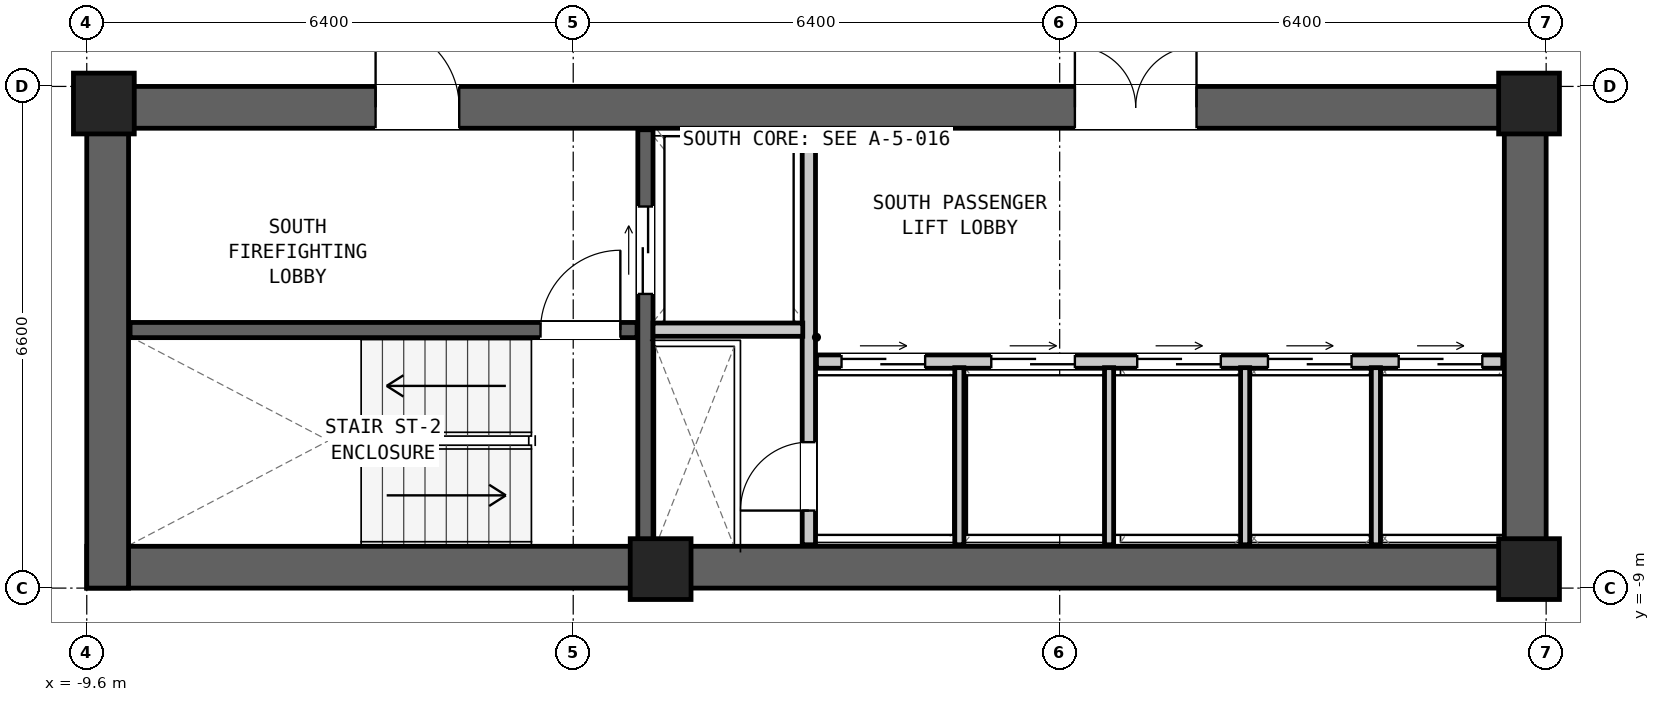
"""IFC4 building model, lengths in metres.
Left out: names, types, materials, properties, quantities, classifications, styles, units other than length and angle.
Written with IfcOpenShell. Run it as: python <this file> out.ifc"""

import sys

from ifc_helpers import new_model, si_unit, direction, frame, frame_2d, origin, origin_2d, place, context, subcontext, project, spatial, rectangle, extrude, element, fill, save


model = new_model("IFC4")
c1 = context("Model", 3, precision=1e-05, world=origin(), true_north=direction((0.0, 1.0)))
c2 = subcontext(c1, "Body", "Model", "MODEL_VIEW")
j1 = project(units=[si_unit("LENGTHUNIT", "METRE"), si_unit("PLANEANGLEUNIT", "RADIAN")], contexts=[c1])
p1 = place(None, origin())
s1 = spatial("IfcSite", under=j1, at=p1, CompositionType="ELEMENT")
p2 = place(p1, origin())
s2 = spatial("IfcBuilding", under=s1, at=p2, CompositionType="ELEMENT")
p3 = place(p2, frame((0.0, 0.0, 47.45)))
s3 = spatial("IfcBuildingStorey", under=s2, at=p3, CompositionType="ELEMENT", Elevation=47.45)
p4 = place(p3, frame((-9.6, -8.725, 0.0), z_axis=(0.0, 0.0, 1.0), x_axis=(1.0, 0.0, 0.0)))
e1 = element("IfcWall", 1, at=p4, inside=s3, PredefinedType="SHEAR", context=c2, shape_type="SweptSolid", body=[
    extrude(rectangle(XDim=19.2, YDim=0.55, at=frame_2d((9.6, 0.0))), origin(), (0.0, 0.0, 1.0), 3.05),
])
p5 = place(p3, frame((-9.6, -2.675, 0.0), z_axis=(0.0, 0.0, 1.0), x_axis=(1.0, 0.0, 0.0)))
e2 = element("IfcWall", 2, at=p5, inside=s3, PredefinedType="SHEAR", context=c2, shape_type="SweptSolid", body=[
    extrude(rectangle(XDim=19.2, YDim=0.55, at=frame_2d((9.6, 0.0))), origin(), (0.0, 0.0, 1.0), 3.05),
])
p6 = place(p5, frame((3.8, 0.0, 0.0)))
e3 = element("IfcOpeningElement", 3, at=p6, cuts=e2, PredefinedType="OPENING", context=c2, shape_type="SweptSolid", body=[
    extrude(rectangle(XDim=1.1, YDim=2.08, at=frame_2d((0.55, 1.04))), frame((0.0, 0.287, 0.0), z_axis=(0.0, -1.0, 0.0), x_axis=(1.0, 0.0, 0.0)), (0.0, 0.0, 1.0), 0.574),
])
p7 = place(p5, frame((13.0, 0.0, 0.0)))
e4 = element("IfcOpeningElement", 4, at=p7, cuts=e2, PredefinedType="OPENING", context=c2, shape_type="SweptSolid", body=[
    extrude(rectangle(XDim=1.6, YDim=2.12, at=frame_2d((0.8, 1.06))), frame((0.0, 0.287, 0.0), z_axis=(0.0, -1.0, 0.0), x_axis=(1.0, 0.0, 0.0)), (0.0, 0.0, 1.0), 0.574),
])
for number, where, z_axis, x_axis in (
    (5, (-9.325, -9.0, 0.0), (0.0, 0.0, 1.0), (0.0, 1.0, 0.0)),
    (6, (9.325, -9.0, 0.0), (0.0, 0.0, 1.0), (0.0, 1.0, 0.0)),
):
    element("IfcWall", number, at=place(p3, frame(where, z_axis=z_axis, x_axis=x_axis)), inside=s3, PredefinedType="SHEAR", context=c2, shape_type="SweptSolid", body=[
        extrude(rectangle(XDim=6.6, YDim=0.55, at=frame_2d((3.3, 0.0))), origin(), (0.0, 0.0, 1.0), 3.05),
    ])
for number, where, z_axis, x_axis in (
    (7, (-9.375, -2.625, 0.0), (0.0, 0.0, 1.0), (1.0, 0.0, 0.0)),
    (8, (9.375, -2.625, 0.0), (0.0, 0.0, 1.0), (1.0, 0.0, 0.0)),
    (9, (-2.05, -8.75, 0.0), (0.0, 0.0, 1.0), (1.0, 0.0, 0.0)),
    (10, (9.375, -8.75, 0.0), (0.0, 0.0, 1.0), (1.0, 0.0, 0.0)),
):
    element("IfcColumn", number, at=place(p3, frame(where, z_axis=z_axis, x_axis=x_axis)), inside=s3, PredefinedType="COLUMN", context=c2, shape_type="SweptSolid", body=[
        extrude(rectangle(XDim=0.8, YDim=0.8, at=origin_2d()), origin(), (0.0, 0.0, 1.0), 3.05),
    ])
p8 = place(p3, frame((-9.03, -5.605, 0.0), z_axis=(0.0, 0.0, 1.0), x_axis=(1.0, 0.0, 0.0)))
e11 = element("IfcWall", 11, at=p8, inside=s3, PredefinedType="SHEAR", context=c2, shape_type="SweptSolid", body=[
    extrude(rectangle(XDim=6.67, YDim=0.2, at=frame_2d((3.335, 0.0))), origin(), (0.0, 0.0, 1.0), 2.83),
])
p9 = place(p8, frame((5.4, 0.0, 0.0)))
e12 = element("IfcOpeningElement", 12, at=p9, cuts=e11, PredefinedType="OPENING", context=c2, shape_type="SweptSolid", body=[
    extrude(rectangle(XDim=1.05, YDim=2.08, at=frame_2d((0.525, 1.04))), frame((0.0, 0.112, 0.0), z_axis=(0.0, -1.0, 0.0), x_axis=(1.0, 0.0, 0.0)), (0.0, 0.0, 1.0), 0.224),
])
p10 = place(p3, frame((-2.25, -8.43, 0.0), z_axis=(0.0, 0.0, 1.0), x_axis=(0.0, 1.0, 0.0)))
e13 = element("IfcWall", 13, at=p10, inside=s3, PredefinedType="SHEAR", context=c2, shape_type="SweptSolid", body=[
    extrude(rectangle(XDim=5.46, YDim=0.2, at=frame_2d((2.73, 0.0))), origin(), (0.0, 0.0, 1.0), 2.83),
])
p11 = place(p10, frame((3.3, 0.0, 0.0)))
e14 = element("IfcOpeningElement", 14, at=p11, cuts=e13, PredefinedType="OPENING", context=c2, shape_type="SweptSolid", body=[
    extrude(rectangle(XDim=1.15, YDim=2.08, at=frame_2d((0.575, 1.04))), frame((0.0, 0.112, 0.0), z_axis=(0.0, -1.0, 0.0), x_axis=(1.0, 0.0, 0.0)), (0.0, 0.0, 1.0), 0.224),
])
p12 = place(p3, frame((-0.1, -8.43, 0.0), z_axis=(0.0, 0.0, 1.0), x_axis=(0.0, 1.0, 0.0)))
e15 = element("IfcWall", 15, at=p12, inside=s3, PredefinedType="PARTITIONING", context=c2, shape_type="SweptSolid", body=[
    extrude(rectangle(XDim=5.46, YDim=0.175, at=frame_2d((2.73, 0.0))), origin(), (0.0, 0.0, 1.0), 2.83),
])
p13 = place(p12, frame((0.45, 0.0, 0.0)))
e16 = element("IfcOpeningElement", 16, at=p13, cuts=e15, PredefinedType="OPENING", context=c2, shape_type="SweptSolid", body=[
    extrude(rectangle(XDim=0.9, YDim=2.05, at=frame_2d((0.45, 1.025))), frame((0.0, 0.1, 0.0), z_axis=(0.0, -1.0, 0.0), x_axis=(1.0, 0.0, 0.0)), (0.0, 0.0, 1.0), 0.199),
])
p14 = place(p3, frame((-2.15, -5.6, 0.0), z_axis=(0.0, 0.0, 1.0), x_axis=(1.0, 0.0, 0.0)))
e17 = element("IfcWall", 17, at=p14, inside=s3, PredefinedType="PARTITIONING", context=c2, shape_type="SweptSolid", body=[
    extrude(rectangle(XDim=1.97, YDim=0.175, at=frame_2d((0.985, 0.0))), origin(), (0.0, 0.0, 1.0), 2.83),
])
p15 = place(p3, frame((0.0, -6.02, 0.0), z_axis=(0.0, 0.0, 1.0), x_axis=(1.0, 0.0, 0.0)))
e18 = element("IfcWall", 18, at=p15, inside=s3, PredefinedType="PARTITIONING", context=c2, shape_type="SweptSolid", body=[
    extrude(rectangle(XDim=9.03, YDim=0.175, at=frame_2d((4.515, 0.0))), origin(), (0.0, 0.0, 1.0), 2.83),
])
p16 = place(p15, frame((0.33, 0.0, 0.0)))
e19 = element("IfcOpeningElement", 19, at=p16, cuts=e18, PredefinedType="OPENING", context=c2, shape_type="SweptSolid", body=[
    extrude(rectangle(XDim=1.1, YDim=2.06, at=frame_2d((0.55, 1.03))), frame((0.0, 0.1, 0.0), z_axis=(0.0, -1.0, 0.0), x_axis=(1.0, 0.0, 0.0)), (0.0, 0.0, 1.0), 0.199),
])
p17 = place(p15, frame((2.3, 0.0, 0.0)))
e20 = element("IfcOpeningElement", 20, at=p17, cuts=e18, PredefinedType="OPENING", context=c2, shape_type="SweptSolid", body=[
    extrude(rectangle(XDim=1.1, YDim=2.06, at=frame_2d((0.55, 1.03))), frame((0.0, 0.1, 0.0), z_axis=(0.0, -1.0, 0.0), x_axis=(1.0, 0.0, 0.0)), (0.0, 0.0, 1.0), 0.199),
])
p18 = place(p15, frame((4.22, 0.0, 0.0)))
e21 = element("IfcOpeningElement", 21, at=p18, cuts=e18, PredefinedType="OPENING", context=c2, shape_type="SweptSolid", body=[
    extrude(rectangle(XDim=1.1, YDim=2.06, at=frame_2d((0.55, 1.03))), frame((0.0, 0.1, 0.0), z_axis=(0.0, -1.0, 0.0), x_axis=(1.0, 0.0, 0.0)), (0.0, 0.0, 1.0), 0.199),
])
p19 = place(p15, frame((5.94, 0.0, 0.0)))
e22 = element("IfcOpeningElement", 22, at=p19, cuts=e18, PredefinedType="OPENING", context=c2, shape_type="SweptSolid", body=[
    extrude(rectangle(XDim=1.1, YDim=2.06, at=frame_2d((0.55, 1.03))), frame((0.0, 0.1, 0.0), z_axis=(0.0, -1.0, 0.0), x_axis=(1.0, 0.0, 0.0)), (0.0, 0.0, 1.0), 0.199),
])
p20 = place(p15, frame((7.66, 0.0, 0.0)))
e23 = element("IfcOpeningElement", 23, at=p20, cuts=e18, PredefinedType="OPENING", context=c2, shape_type="SweptSolid", body=[
    extrude(rectangle(XDim=1.1, YDim=2.06, at=frame_2d((0.55, 1.03))), frame((0.0, 0.1, 0.0), z_axis=(0.0, -1.0, 0.0), x_axis=(1.0, 0.0, 0.0)), (0.0, 0.0, 1.0), 0.199),
])
for number, where, z_axis, x_axis in (
    (24, (1.88, -8.43, 0.0), (0.0, 0.0, 1.0), (0.0, 1.0, 0.0)),
    (25, (3.85, -8.43, 0.0), (0.0, 0.0, 1.0), (0.0, 1.0, 0.0)),
    (26, (5.64, -8.43, 0.0), (0.0, 0.0, 1.0), (0.0, 1.0, 0.0)),
    (27, (7.36, -8.43, 0.0), (0.0, 0.0, 1.0), (0.0, 1.0, 0.0)),
):
    element("IfcWall", number, at=place(p3, frame(where, z_axis=z_axis, x_axis=x_axis)), inside=s3, PredefinedType="PARTITIONING", context=c2, shape_type="SweptSolid", body=[
        extrude(rectangle(XDim=2.33, YDim=0.12, at=frame_2d((1.165, 0.0))), origin(), (0.0, 0.0, 1.0), 2.83),
    ])
p21 = place(p9, origin())
e28 = element("IfcDoor", 28, at=p21, inside=s3, OperationType="SINGLE_SWING_RIGHT", PredefinedType="DOOR", context=c2, shape_type="SweptSolid", body=[
    extrude(rectangle(XDim=1.05, YDim=2.08, at=frame_2d((0.525, 1.04))), frame((0.0, 0.025, 0.0), z_axis=(0.0, -1.0, 0.0), x_axis=(1.0, 0.0, 0.0)), (0.0, 0.0, 1.0), 0.05),
])
fill(e12, e28)
p22 = place(p6, origin())
e29 = element("IfcDoor", 29, at=p22, inside=s3, OperationType="SINGLE_SWING_LEFT", PredefinedType="DOOR", context=c2, shape_type="SweptSolid", body=[
    extrude(rectangle(XDim=1.1, YDim=2.08, at=frame_2d((0.55, 1.04))), frame((0.0, 0.025, 0.0), z_axis=(0.0, -1.0, 0.0), x_axis=(1.0, 0.0, 0.0)), (0.0, 0.0, 1.0), 0.05),
])
fill(e3, e29)
p23 = place(p11, origin())
e30 = element("IfcDoor", 30, at=p23, inside=s3, OperationType="DOUBLE_DOOR_SLIDING", PredefinedType="DOOR", context=c2, shape_type="SweptSolid", body=[
    extrude(rectangle(XDim=1.15, YDim=2.08, at=frame_2d((0.575, 1.04))), frame((0.0, 0.025, 0.0), z_axis=(0.0, -1.0, 0.0), x_axis=(1.0, 0.0, 0.0)), (0.0, 0.0, 1.0), 0.05),
])
fill(e14, e30)
p24 = place(p13, origin())
e31 = element("IfcDoor", 31, at=p24, inside=s3, OperationType="SINGLE_SWING_LEFT", PredefinedType="DOOR", context=c2, shape_type="SweptSolid", body=[
    extrude(rectangle(XDim=0.9, YDim=2.05, at=frame_2d((0.45, 1.025))), frame((0.0, 0.025, 0.0), z_axis=(0.0, -1.0, 0.0), x_axis=(1.0, 0.0, 0.0)), (0.0, 0.0, 1.0), 0.05),
])
fill(e16, e31)
p25 = place(p7, origin())
e32 = element("IfcDoor", 32, at=p25, inside=s3, OperationType="DOUBLE_DOOR_SINGLE_SWING", PredefinedType="DOOR", context=c2, shape_type="SweptSolid", body=[
    extrude(rectangle(XDim=1.6, YDim=2.12, at=frame_2d((0.8, 1.06))), frame((0.0, 0.025, 0.0), z_axis=(0.0, -1.0, 0.0), x_axis=(1.0, 0.0, 0.0)), (0.0, 0.0, 1.0), 0.05),
])
fill(e4, e32)
p26 = place(p16, origin())
e33 = element("IfcDoor", 33, at=p26, inside=s3, OperationType="DOUBLE_DOOR_SLIDING", PredefinedType="DOOR", context=c2, shape_type="SweptSolid", body=[
    extrude(rectangle(XDim=1.1, YDim=2.06, at=frame_2d((0.55, 1.03))), frame((0.0, 0.025, 0.0), z_axis=(0.0, -1.0, 0.0), x_axis=(1.0, 0.0, 0.0)), (0.0, 0.0, 1.0), 0.05),
])
fill(e19, e33)
p27 = place(p17, origin())
e34 = element("IfcDoor", 34, at=p27, inside=s3, OperationType="DOUBLE_DOOR_SLIDING", PredefinedType="DOOR", context=c2, shape_type="SweptSolid", body=[
    extrude(rectangle(XDim=1.1, YDim=2.06, at=frame_2d((0.55, 1.03))), frame((0.0, 0.025, 0.0), z_axis=(0.0, -1.0, 0.0), x_axis=(1.0, 0.0, 0.0)), (0.0, 0.0, 1.0), 0.05),
])
fill(e20, e34)
p28 = place(p18, origin())
e35 = element("IfcDoor", 35, at=p28, inside=s3, OperationType="DOUBLE_DOOR_SLIDING", PredefinedType="DOOR", context=c2, shape_type="SweptSolid", body=[
    extrude(rectangle(XDim=1.1, YDim=2.06, at=frame_2d((0.55, 1.03))), frame((0.0, 0.025, 0.0), z_axis=(0.0, -1.0, 0.0), x_axis=(1.0, 0.0, 0.0)), (0.0, 0.0, 1.0), 0.05),
])
fill(e21, e35)
p29 = place(p19, origin())
e36 = element("IfcDoor", 36, at=p29, inside=s3, OperationType="DOUBLE_DOOR_SLIDING", PredefinedType="DOOR", context=c2, shape_type="SweptSolid", body=[
    extrude(rectangle(XDim=1.1, YDim=2.06, at=frame_2d((0.55, 1.03))), frame((0.0, 0.025, 0.0), z_axis=(0.0, -1.0, 0.0), x_axis=(1.0, 0.0, 0.0)), (0.0, 0.0, 1.0), 0.05),
])
fill(e22, e36)
p30 = place(p20, origin())
e37 = element("IfcDoor", 37, at=p30, inside=s3, OperationType="DOUBLE_DOOR_SLIDING", PredefinedType="DOOR", context=c2, shape_type="SweptSolid", body=[
    extrude(rectangle(XDim=1.1, YDim=2.06, at=frame_2d((0.55, 1.03))), frame((0.0, 0.025, 0.0), z_axis=(0.0, -1.0, 0.0), x_axis=(1.0, 0.0, 0.0)), (0.0, 0.0, 1.0), 0.05),
])
fill(e23, e37)
save(model, sys.argv[1])
